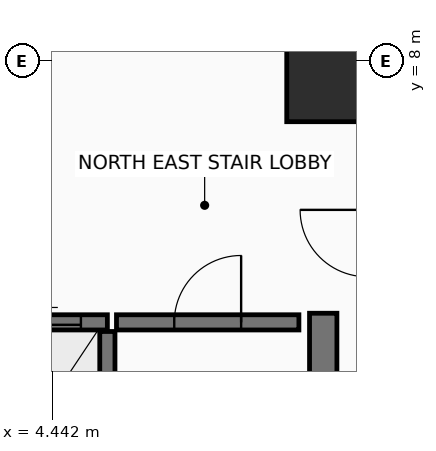
"""IFC4 building model, lengths in metres.
Left out: names, types, materials, properties, quantities, classifications, styles, units other than length and angle.
Written with IfcOpenShell. Run it as: python <this file> out.ifc"""

import sys

from ifc_helpers import new_model, si_unit, direction, frame, frame_2d, origin, origin_2d, place, context, subcontext, project, spatial, rectangle, extrude, element, fill, save


model = new_model("IFC4")
c1 = context("Model", 3, precision=1e-05, world=origin(), true_north=direction((0.0, 1.0)))
c2 = subcontext(c1, "Body", "Model", "MODEL_VIEW")
j1 = project(units=[si_unit("LENGTHUNIT", "METRE"), si_unit("PLANEANGLEUNIT", "RADIAN")], contexts=[c1])
p1 = place(None, origin())
s1 = spatial("IfcSite", under=j1, at=p1, CompositionType="ELEMENT")
p2 = place(p1, origin())
s2 = spatial("IfcBuilding", under=s1, at=p2, CompositionType="ELEMENT")
p3 = place(p2, frame((0.0, 0.0, 184.9)))
s3 = spatial("IfcBuildingStorey", under=s2, at=p3, CompositionType="ELEMENT", Elevation=184.9)
p4 = place(p3, frame((8.9, 7.6, 0.0), z_axis=(0.0, 0.0, 1.0), x_axis=(1.0, 0.0, 0.0)))
e1 = element("IfcColumn", 1, at=p4, inside=s3, PredefinedType="COLUMN", context=c2, shape_type="SweptSolid", body=[
    extrude(rectangle(XDim=1.2, YDim=1.2, at=origin_2d()), origin(), (0.0, 0.0, 1.0), 3.6),
])
p5 = place(p3, frame((8.9, -6.85, 0.0), z_axis=(0.0, 0.0, 1.0), x_axis=(0.0, 1.0, 0.0)))
e2 = element("IfcWall", 2, at=p5, inside=s3, PredefinedType="SHEAR", context=c2, shape_type="SweptSolid", body=[
    extrude(rectangle(XDim=10.7, YDim=0.45, at=frame_2d((5.35, 0.0))), origin(), (0.0, 0.0, 1.0), 3.42),
])
p6 = place(p3, frame((5.35, -3.75, 0.0), z_axis=(0.0, 0.0, 1.0), x_axis=(0.0, 1.0, 0.0)))
e3 = element("IfcWall", 3, at=p6, inside=s3, PredefinedType="SHEAR", context=c2, shape_type="SweptSolid", body=[
    extrude(rectangle(XDim=7.3, YDim=0.25, at=frame_2d((3.65, 0.0))), origin(), (0.0, 0.0, 1.0), 3.42),
])
p7 = place(p3, frame((5.5, 3.7, 0.0), z_axis=(0.0, 0.0, 1.0), x_axis=(1.0, 0.0, 0.0)))
e4 = element("IfcWall", 4, at=p7, inside=s3, PredefinedType="SHEAR", context=c2, shape_type="SweptSolid", body=[
    extrude(rectangle(XDim=3.0, YDim=0.25, at=frame_2d((1.5, 0.0))), origin(), (0.0, 0.0, 1.0), 3.42),
])
p8 = place(p7, frame((0.95, 0.0, 0.0)))
e5 = element("IfcOpeningElement", 5, at=p8, cuts=e4, PredefinedType="OPENING", context=c2, shape_type="SweptSolid", body=[
    extrude(rectangle(XDim=1.1, YDim=2.15, at=frame_2d((0.55, 1.075))), frame((0.0, 0.135, 0.0), z_axis=(0.0, -1.0, 0.0), x_axis=(1.0, 0.0, 0.0)), (0.0, 0.0, 1.0), 0.27),
])
p9 = place(p3, frame((3.28, 3.7, 0.0), z_axis=(0.0, 0.0, 1.0), x_axis=(1.0, 0.0, 0.0)))
e6 = element("IfcWall", 6, at=p9, inside=s3, PredefinedType="SHEAR", context=c2, shape_type="SweptSolid", body=[
    extrude(rectangle(XDim=2.07, YDim=0.25, at=frame_2d((1.035, 0.0))), origin(), (0.0, 0.0, 1.0), 3.42),
])
p10 = place(p9, frame((0.435, 0.0, 0.0)))
e7 = element("IfcOpeningElement", 7, at=p10, cuts=e6, PredefinedType="OPENING", context=c2, shape_type="SweptSolid", body=[
    extrude(rectangle(XDim=1.2, YDim=2.2, at=frame_2d((0.6, 1.1))), frame((0.0, 0.135, 0.0), z_axis=(0.0, -1.0, 0.0), x_axis=(1.0, 0.0, 0.0)), (0.0, 0.0, 1.0), 0.27),
])
p11 = place(p8, frame((1.1, 0.0, 0.0), z_axis=(0.0, 0.0, 1.0), x_axis=(-1.0, 0.0, 0.0)))
e8 = element("IfcDoor", 8, at=p11, inside=s3, OperationType="SINGLE_SWING_LEFT", PredefinedType="DOOR", context=c2, shape_type="SweptSolid", body=[
    extrude(rectangle(XDim=1.1, YDim=2.15, at=frame_2d((0.55, 1.075))), frame((0.0, 0.025, 0.0), z_axis=(0.0, -1.0, 0.0), x_axis=(1.0, 0.0, 0.0)), (0.0, 0.0, 1.0), 0.05),
])
fill(e5, e8)
p12 = place(p10, origin())
e9 = element("IfcDoor", 9, at=p12, inside=s3, OperationType="SLIDING_TO_RIGHT", PredefinedType="DOOR", context=c2, shape_type="SweptSolid", body=[
    extrude(rectangle(XDim=1.2, YDim=2.2, at=frame_2d((0.6, 1.1))), frame((0.0, 0.025, 0.0), z_axis=(0.0, -1.0, 0.0), x_axis=(1.0, 0.0, 0.0)), (0.0, 0.0, 1.0), 0.05),
])
fill(e7, e9)
save(model, sys.argv[1])
